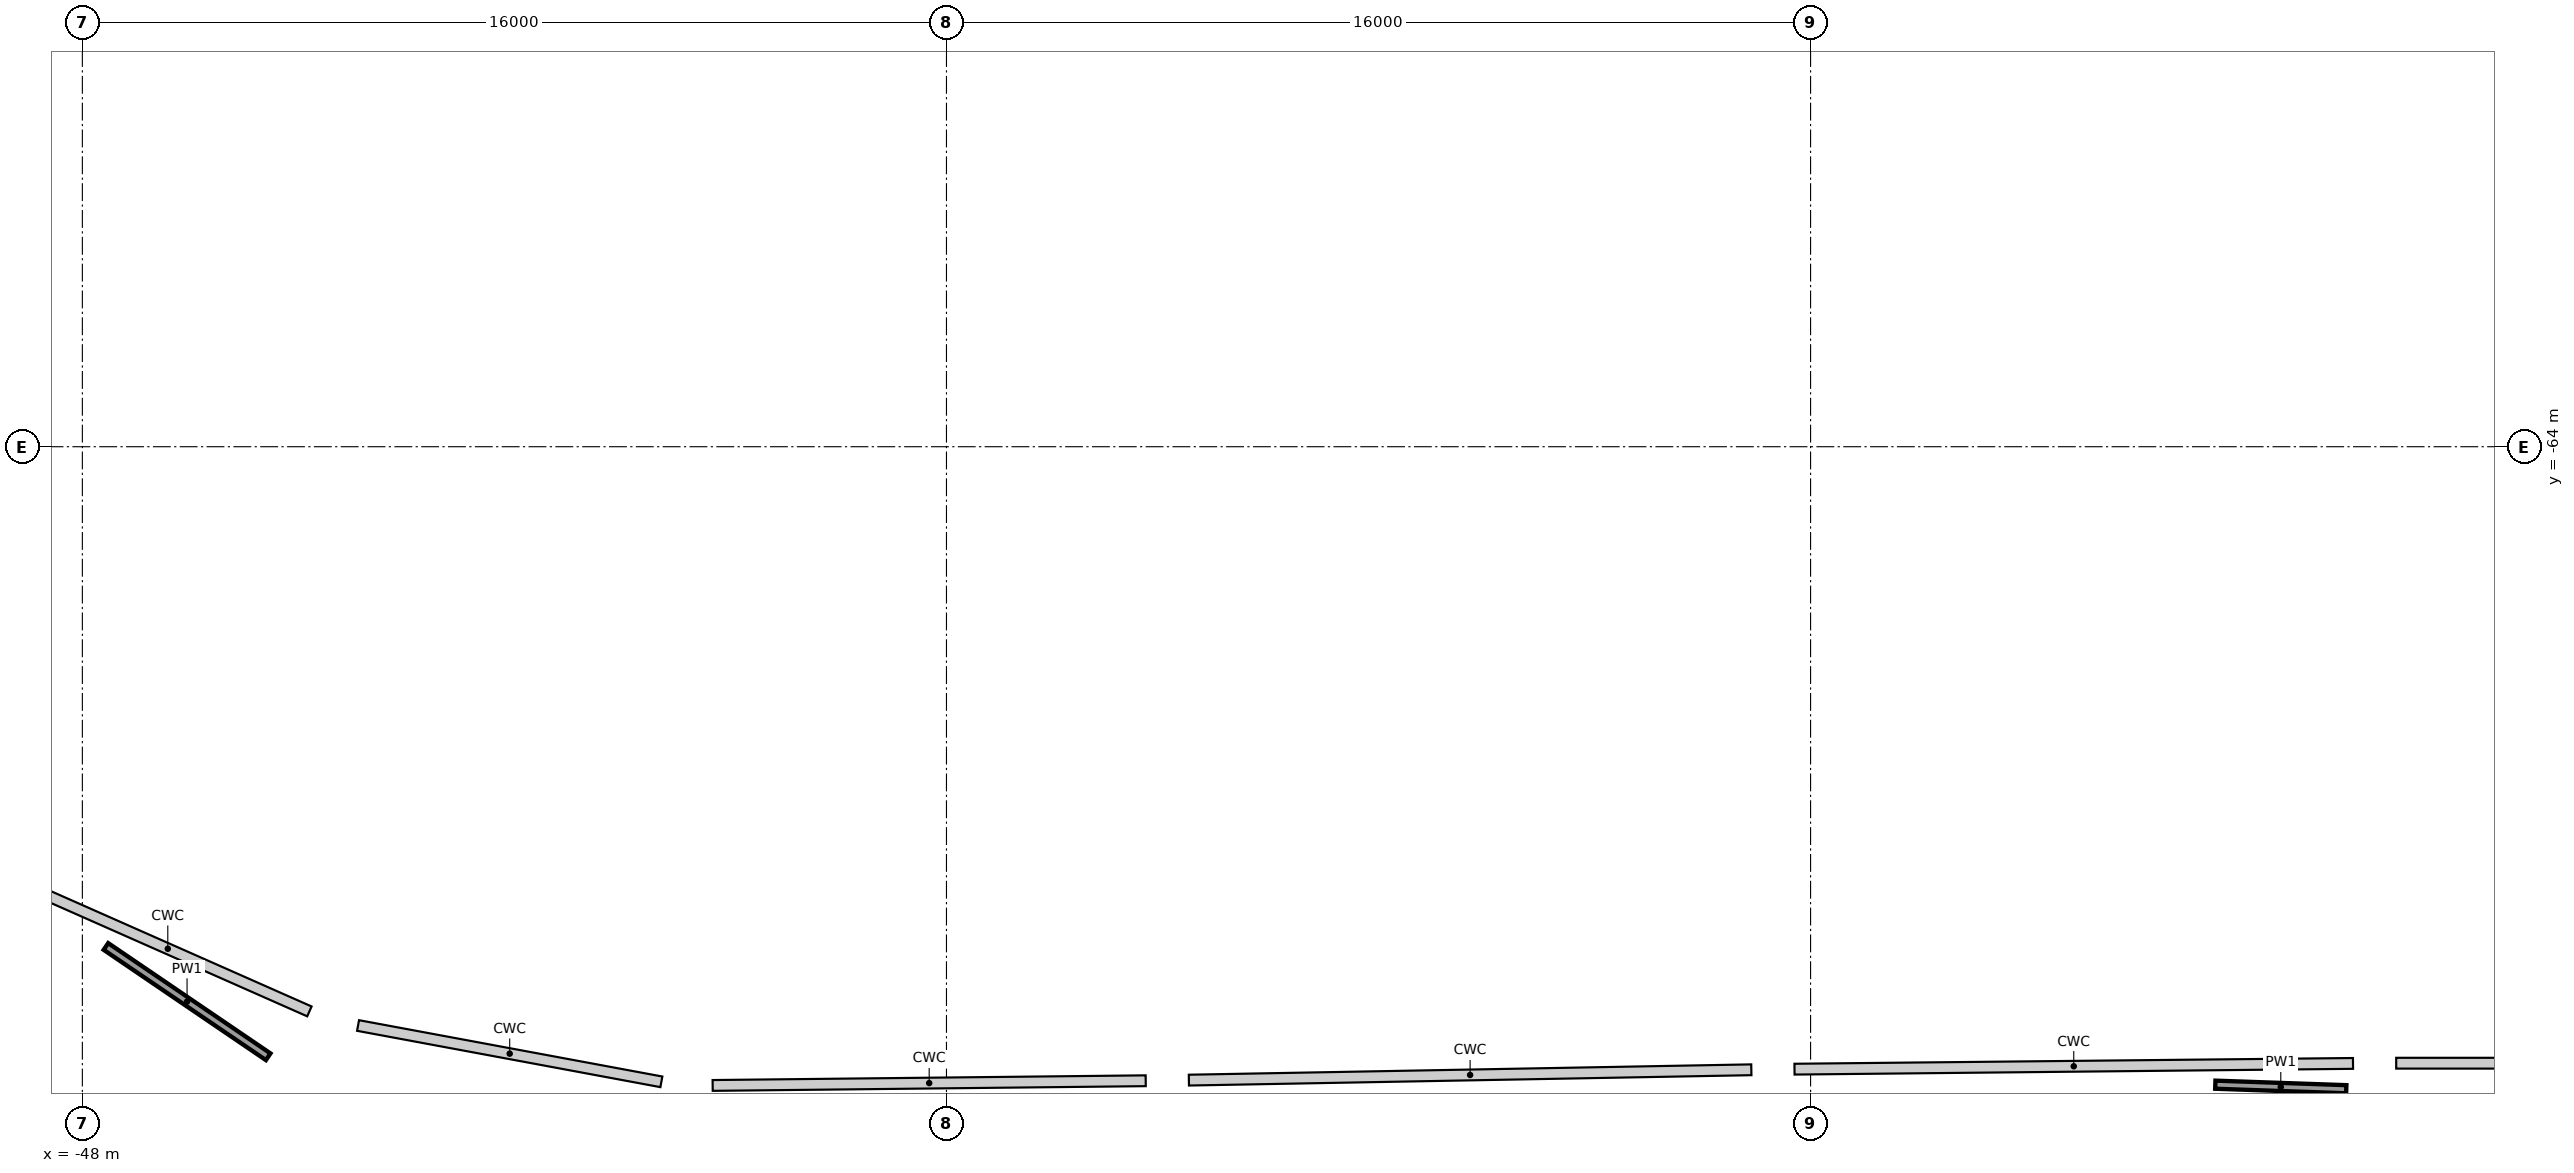
"""IFC4 building model, lengths in metres.
Left out: names, types, materials, properties, quantities, classifications, styles, units other than length and angle.
Written with IfcOpenShell. Run it as: python <this file> out.ifc"""

import sys

from ifc_helpers import new_model, si_unit, direction, frame, frame_2d, origin, origin_2d, place, context, subcontext, project, spatial, rectangle, circle, extrude, element, save


model = new_model("IFC4")
c1 = context("Model", 3, precision=1e-05, world=origin(), true_north=direction((0.0, 1.0)))
c2 = subcontext(c1, "Body", "Model", "MODEL_VIEW")
j1 = project(units=[si_unit("LENGTHUNIT", "METRE"), si_unit("PLANEANGLEUNIT", "RADIAN")], contexts=[c1])
p1 = place(None, origin())
s1 = spatial("IfcSite", under=j1, at=p1, CompositionType="ELEMENT")
p2 = place(p1, origin())
s2 = spatial("IfcBuilding", under=s1, at=p2, CompositionType="ELEMENT")
p3 = place(p2, frame((0.0, 0.0, 6.5)))
s3 = spatial("IfcBuildingStorey", under=s2, at=p3, CompositionType="ELEMENT", Elevation=6.5)
p4 = place(p3, frame((-45.777, -68.5, 0.0), z_axis=(0.0, 0.0, 1.0), x_axis=(1.0, 0.0, 0.0)))
e1 = element("IfcColumn", 1, at=p4, inside=s3, PredefinedType="COLUMN", context=c2, shape_type="SweptSolid", body=[
    extrude(circle(Radius=0.45, at=origin_2d()), origin(), (0.0, 0.0, 1.0), 5.72),
])
p5 = place(p3, frame((-40.308, -70.748, 0.0), z_axis=(0.0, 0.0, 1.0), x_axis=(1.0, 0.0, 0.0)))
e2 = element("IfcColumn", 2, at=p5, inside=s3, PredefinedType="COLUMN", context=c2, shape_type="SweptSolid", body=[
    extrude(circle(Radius=0.45, at=origin_2d()), origin(), (0.0, 0.0, 1.0), 5.868),
])
p6 = place(p3, frame((-43.43, -74.617, 0.0), z_axis=(0.0, 0.0, 1.0), x_axis=(1.0, 0.0, 0.0)))
e3 = element("IfcColumn", 3, at=p6, inside=s3, PredefinedType="COLUMN", context=c2, shape_type="SweptSolid", body=[
    extrude(circle(Radius=0.4, at=origin_2d()), origin(), (0.0, 0.0, 1.0), 5.5),
])
p7 = place(p3, frame((-44.39, -75.806, 0.0), z_axis=(0.0, 0.0, 1.0), x_axis=(1.0, 0.0, 0.0)))
e4 = element("IfcColumn", 4, at=p7, inside=s3, PredefinedType="COLUMN", context=c2, shape_type="SweptSolid", body=[
    extrude(circle(Radius=0.35, at=origin_2d()), origin(), (0.0, 0.0, 1.0), 5.5),
])
p8 = place(p3, frame((-34.761, -72.156, 0.0), z_axis=(0.0, 0.0, 1.0), x_axis=(1.0, 0.0, 0.0)))
e5 = element("IfcColumn", 5, at=p8, inside=s3, PredefinedType="COLUMN", context=c2, shape_type="SweptSolid", body=[
    extrude(circle(Radius=0.45, at=origin_2d()), origin(), (0.0, 0.0, 1.0), 5.5),
])
p9 = place(p3, frame((-36.886, -75.833, 0.0), z_axis=(0.0, 0.0, 1.0), x_axis=(1.0, 0.0, 0.0)))
e6 = element("IfcColumn", 6, at=p9, inside=s3, PredefinedType="COLUMN", context=c2, shape_type="SweptSolid", body=[
    extrude(circle(Radius=0.4, at=origin_2d()), origin(), (0.0, 0.0, 1.0), 5.5),
])
p10 = place(p3, frame((-26.038, -71.014, 0.0), z_axis=(0.0, 0.0, 1.0), x_axis=(1.0, 0.0, 0.0)))
e7 = element("IfcColumn", 7, at=p10, inside=s3, PredefinedType="COLUMN", context=c2, shape_type="SweptSolid", body=[
    extrude(circle(Radius=0.45, at=origin_2d()), origin(), (0.0, 0.0, 1.0), 5.936),
])
p11 = place(p3, frame((-27.911, -75.736, 0.0), z_axis=(0.0, 0.0, 1.0), x_axis=(1.0, 0.0, 0.0)))
e8 = element("IfcColumn", 8, at=p11, inside=s3, PredefinedType="COLUMN", context=c2, shape_type="SweptSolid", body=[
    extrude(circle(Radius=0.4, at=origin_2d()), origin(), (0.0, 0.0, 1.0), 5.5),
])
p12 = place(p3, frame((-15.621, -71.009, 0.0), z_axis=(0.0, 0.0, 1.0), x_axis=(1.0, 0.0, 0.0)))
e9 = element("IfcColumn", 9, at=p12, inside=s3, PredefinedType="COLUMN", context=c2, shape_type="SweptSolid", body=[
    extrude(circle(Radius=0.45, at=origin_2d()), origin(), (0.0, 0.0, 1.0), 5.626),
])
p13 = place(p3, frame((-16.698, -75.53, 0.0), z_axis=(0.0, 0.0, 1.0), x_axis=(1.0, 0.0, 0.0)))
e10 = element("IfcColumn", 10, at=p13, inside=s3, PredefinedType="COLUMN", context=c2, shape_type="SweptSolid", body=[
    extrude(circle(Radius=0.4, at=origin_2d()), origin(), (0.0, 0.0, 1.0), 5.5),
])
p14 = place(p3, frame((-5.192, -70.824, 0.0), z_axis=(0.0, 0.0, 1.0), x_axis=(1.0, 0.0, 0.0)))
e11 = element("IfcColumn", 11, at=p14, inside=s3, PredefinedType="COLUMN", context=c2, shape_type="SweptSolid", body=[
    extrude(circle(Radius=0.45, at=origin_2d()), origin(), (0.0, 0.0, 1.0), 5.058),
])
p15 = place(p3, frame((-5.557, -75.415, 0.0), z_axis=(0.0, 0.0, 1.0), x_axis=(1.0, 0.0, 0.0)))
e12 = element("IfcColumn", 12, at=p15, inside=s3, PredefinedType="COLUMN", context=c2, shape_type="SweptSolid", body=[
    extrude(circle(Radius=0.4, at=origin_2d()), origin(), (0.0, 0.0, 1.0), 5.5),
])
p16 = place(p3, frame((-47.563, -73.253, 0.0), z_axis=(0.0, 0.0, 1.0), x_axis=(0.827001497717, -0.562199717871, 0.0)))
e13 = element("IfcWall", 13, at=p16, inside=s3, PredefinedType="PARTITIONING", context=c2, shape_type="SweptSolid", body=[
    extrude(rectangle(XDim=3.633, YDim=0.15, at=frame_2d((1.816, 0.0))), origin(), (0.0, 0.0, 1.0), 5.15),
])
p17 = place(p3, frame((-8.506, -75.813, 0.0), z_axis=(0.0, 0.0, 1.0), x_axis=(0.999400729442, -0.034614765498, 0.0)))
e14 = element("IfcWall", 14, at=p17, inside=s3, PredefinedType="PARTITIONING", context=c2, shape_type="SweptSolid", body=[
    extrude(rectangle(XDim=2.426, YDim=0.15, at=frame_2d((1.213, 0.0))), origin(), (0.0, 0.0, 1.0), 5.15),
])
save(model, sys.argv[1])
